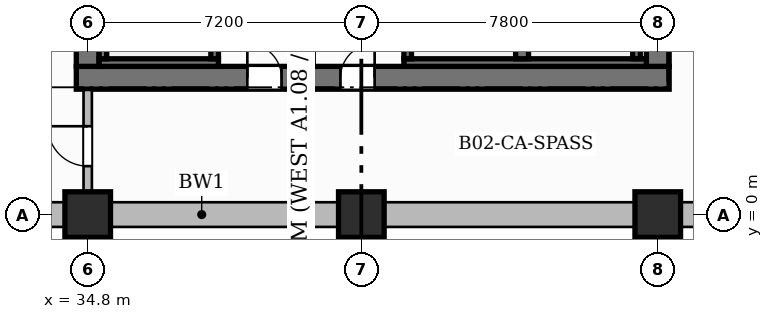
"""IFC4 building model, lengths in metres.
Left out: names, types, materials, properties, quantities, classifications, styles, units other than length and angle.
Written with IfcOpenShell. Run it as: python <this file> out.ifc"""

import sys

from ifc_helpers import new_model, si_unit, direction, frame, frame_2d, origin, origin_2d, place, context, subcontext, project, spatial, rectangle, extrude, source, transform, mapped, element, fill, save


model = new_model("IFC4")
c1 = context("Model", 3, precision=1e-05, world=origin(), true_north=direction((0.0, 1.0)))
c2 = subcontext(c1, "Body", "Model", "MODEL_VIEW")
j1 = project(units=[si_unit("LENGTHUNIT", "METRE"), si_unit("PLANEANGLEUNIT", "RADIAN")], contexts=[c1])
p1 = place(None, origin())
s1 = spatial("IfcSite", under=j1, at=p1, CompositionType="ELEMENT")
p2 = place(p1, origin())
s2 = spatial("IfcBuilding", under=s1, at=p2, CompositionType="ELEMENT")
p3 = place(p2, frame((0.0, 0.0, -13.0)))
s3 = spatial("IfcBuildingStorey", under=s2, at=p3, CompositionType="ELEMENT", Elevation=-13.0)
p4 = place(p3, frame((-4.8, 0.0, -0.4), z_axis=(0.0, 0.0, 1.0), x_axis=(1.0, 0.0, 0.0)))
e1 = element("IfcWall", 1, at=p4, inside=s3, PredefinedType="USERDEFINED", context=c2, shape_type="SweptSolid", body=[
    extrude(rectangle(XDim=85.2, YDim=0.65, at=frame_2d((42.6, 0.0))), origin(), (0.0, 0.0, 1.0), 6.9),
])
p5 = place(p3, frame((34.5, 3.6, -0.4), z_axis=(0.0, 0.0, 1.0), x_axis=(1.0, 0.0, 0.0)))
e2 = element("IfcWall", 2, at=p5, inside=s3, PredefinedType="SHEAR", context=c2, shape_type="SweptSolid", body=[
    extrude(rectangle(XDim=15.6, YDim=0.6, at=frame_2d((7.8, 0.0))), origin(), (0.0, 0.0, 1.0), 6.9),
])
p6 = place(p5, frame((4.5, 0.0, 0.4)))
e3 = element("IfcOpeningElement", 3, at=p6, cuts=e2, PredefinedType="OPENING", context=c2, shape_type="SweptSolid", body=[
    extrude(rectangle(XDim=0.9, YDim=2.1, at=frame_2d((0.45, 1.05))), frame((0.0, 0.31, 0.0), z_axis=(0.0, -1.0, 0.0), x_axis=(1.0, 0.0, 0.0)), (0.0, 0.0, 1.0), 0.62),
])
p7 = place(p5, frame((6.95, 0.0, 0.4)))
e4 = element("IfcOpeningElement", 4, at=p7, cuts=e2, PredefinedType="OPENING", context=c2, shape_type="SweptSolid", body=[
    extrude(rectangle(XDim=0.9, YDim=2.1, at=frame_2d((0.45, 1.05))), frame((0.0, 0.31, 0.0), z_axis=(0.0, -1.0, 0.0), x_axis=(1.0, 0.0, 0.0)), (0.0, 0.0, 1.0), 0.62),
])
for number, where, z_axis, x_axis in (
    (5, (34.8, 3.9, -0.4), (0.0, 0.0, 1.0), (0.0, 1.0, 0.0)),
    (6, (49.8, 3.9, -0.4), (0.0, 0.0, 1.0), (0.0, 1.0, 0.0)),
):
    element("IfcWall", number, at=place(p3, frame(where, z_axis=z_axis, x_axis=x_axis)), inside=s3, PredefinedType="SHEAR", context=c2, shape_type="SweptSolid", body=[
        extrude(rectangle(XDim=10.2, YDim=0.6, at=frame_2d((5.1, 0.0))), origin(), (0.0, 0.0, 1.0), 6.9),
    ])
m1 = source(origin(), c2, "Body", "SweptSolid", [
    extrude(rectangle(XDim=1.2, YDim=1.2, at=origin_2d()), origin(), (0.0, 0.0, 1.0), 6.9),
])
for number, where, z_axis, x_axis in (
    (7, (34.8, 0.0, -0.4), (0.0, 0.0, 1.0), (1.0, 0.0, 0.0)),
    (8, (42.0, 0.0, -0.4), (0.0, 0.0, 1.0), (1.0, 0.0, 0.0)),
    (9, (49.8, 0.0, -0.4), (0.0, 0.0, 1.0), (1.0, 0.0, 0.0)),
):
    element("IfcColumn", number, at=place(p3, frame(where, z_axis=z_axis, x_axis=x_axis)), inside=s3, PredefinedType="COLUMN", context=c2, shape_type="MappedRepresentation", body=[
        mapped(m1, transform((0.0, 0.0, 0.0), scale=1.0)),
    ])
p8 = place(p3, frame((35.1, 4.0, -0.4), z_axis=(0.0, 0.0, 1.0), x_axis=(1.0, 0.0, 0.0)))
e10 = element("IfcWall", 10, at=p8, inside=s3, PredefinedType="SHEAR", context=c2, shape_type="SweptSolid", body=[
    extrude(rectangle(XDim=3.14, YDim=0.2, at=frame_2d((1.57, 0.0))), origin(), (0.0, 0.0, 1.0), 6.9),
])
for number, where, z_axis, x_axis in (
    (11, (35.2, 4.1, -0.4), (0.0, 0.0, 1.0), (0.0, 1.0, 0.0)),
    (12, (38.14, 4.1, -0.4), (0.0, 0.0, 1.0), (0.0, 1.0, 0.0)),
):
    element("IfcWall", number, at=place(p3, frame(where, z_axis=z_axis, x_axis=x_axis)), inside=s3, PredefinedType="SHEAR", context=c2, shape_type="SweptSolid", body=[
        extrude(rectangle(XDim=6.95, YDim=0.2, at=frame_2d((3.475, 0.0))), origin(), (0.0, 0.0, 1.0), 6.9),
    ])
p9 = place(p3, frame((43.12, 4.0, -0.4), z_axis=(0.0, 0.0, 1.0), x_axis=(1.0, 0.0, 0.0)))
e13 = element("IfcWall", 13, at=p9, inside=s3, PredefinedType="SHEAR", context=c2, shape_type="SweptSolid", body=[
    extrude(rectangle(XDim=6.38, YDim=0.2, at=frame_2d((3.19, 0.0))), origin(), (0.0, 0.0, 1.0), 6.9),
])
p10 = place(p3, frame((43.22, 4.1, -0.4), z_axis=(0.0, 0.0, 1.0), x_axis=(0.0, 1.0, 0.0)))
e14 = element("IfcWall", 14, at=p10, inside=s3, PredefinedType="SHEAR", context=c2, shape_type="SweptSolid", body=[
    extrude(rectangle(XDim=6.95, YDim=0.2, at=frame_2d((3.475, 0.0))), origin(), (0.0, 0.0, 1.0), 6.9),
])
p11 = place(p3, frame((46.23, 4.1, -0.4), z_axis=(0.0, 0.0, 1.0), x_axis=(0.0, 1.0, 0.0)))
e15 = element("IfcWall", 15, at=p11, inside=s3, PredefinedType="SHEAR", context=c2, shape_type="SweptSolid", body=[
    extrude(rectangle(XDim=6.95, YDim=0.34, at=frame_2d((3.475, 0.0))), origin(), (0.0, 0.0, 1.0), 6.9),
])
p12 = place(p3, frame((49.24, 4.1, -0.4), z_axis=(0.0, 0.0, 1.0), x_axis=(0.0, 1.0, 0.0)))
e16 = element("IfcWall", 16, at=p12, inside=s3, PredefinedType="SHEAR", context=c2, shape_type="SweptSolid", body=[
    extrude(rectangle(XDim=6.95, YDim=0.2, at=frame_2d((3.475, 0.0))), origin(), (0.0, 0.0, 1.0), 6.9),
])
p13 = place(p3, frame((40.7, 3.92, 0.0), z_axis=(0.0, 0.0, 1.0), x_axis=(0.0, 1.0, 0.0)))
e17 = element("IfcWall", 17, at=p13, inside=s3, PredefinedType="PARTITIONING", context=c2, shape_type="SweptSolid", body=[
    extrude(rectangle(XDim=3.99, YDim=0.14, at=frame_2d((1.995, 0.0))), origin(), (0.0, 0.0, 1.0), 6.1),
])
p14 = place(p3, frame((34.8, 0.37, 0.0), z_axis=(0.0, 0.0, 1.0), x_axis=(0.0, 1.0, 0.0)))
e18 = element("IfcWall", 18, at=p14, inside=s3, PredefinedType="PARTITIONING", context=c2, shape_type="SweptSolid", body=[
    extrude(rectangle(XDim=2.91, YDim=0.22, at=frame_2d((1.455, 0.0))), origin(), (0.0, 0.0, 1.0), 6.1),
])
p15 = place(p14, frame((0.905, 0.0, 0.0)))
e19 = element("IfcOpeningElement", 19, at=p15, cuts=e18, PredefinedType="OPENING", context=c2, shape_type="SweptSolid", body=[
    extrude(rectangle(XDim=1.05, YDim=2.15, at=frame_2d((0.525, 1.075))), frame((0.0, 0.12, 0.0), z_axis=(0.0, -1.0, 0.0), x_axis=(1.0, 0.0, 0.0)), (0.0, 0.0, 1.0), 0.24),
])
m2 = source(origin(), c2, "Body", "SweptSolid", [
    extrude(rectangle(XDim=0.9, YDim=2.1, at=frame_2d((0.45, 1.05))), frame((0.0, 0.025, 0.0), z_axis=(0.0, -1.0, 0.0), x_axis=(1.0, 0.0, 0.0)), (0.0, 0.0, 1.0), 0.05),
])
p16 = place(p6, origin())
e20 = element("IfcDoor", 20, at=p16, inside=s3, OperationType="SINGLE_SWING_LEFT", PredefinedType="DOOR", context=c2, shape_type="MappedRepresentation", body=[
    mapped(m2, transform((0.0, 0.0, 0.0), scale=1.0)),
])
fill(e3, e20)
p17 = place(p7, origin())
e21 = element("IfcDoor", 21, at=p17, inside=s3, OperationType="SINGLE_SWING_RIGHT", PredefinedType="DOOR", context=c2, shape_type="MappedRepresentation", body=[
    mapped(m2, transform((0.0, 0.0, 0.0), scale=1.0)),
])
fill(e4, e21)
m3 = source(origin(), c2, "Body", "SweptSolid", [
    extrude(rectangle(XDim=1.05, YDim=2.15, at=frame_2d((0.525, 1.075))), frame((0.0, 0.025, 0.0), z_axis=(0.0, -1.0, 0.0), x_axis=(1.0, 0.0, 0.0)), (0.0, 0.0, 1.0), 0.05),
])
p18 = place(p15, origin())
e22 = element("IfcDoor", 22, at=p18, inside=s3, OperationType="SINGLE_SWING_RIGHT", PredefinedType="DOOR", context=c2, shape_type="MappedRepresentation", body=[
    mapped(m3, transform((0.0, 0.0, 0.0), scale=1.0)),
])
fill(e19, e22)
save(model, sys.argv[1])
